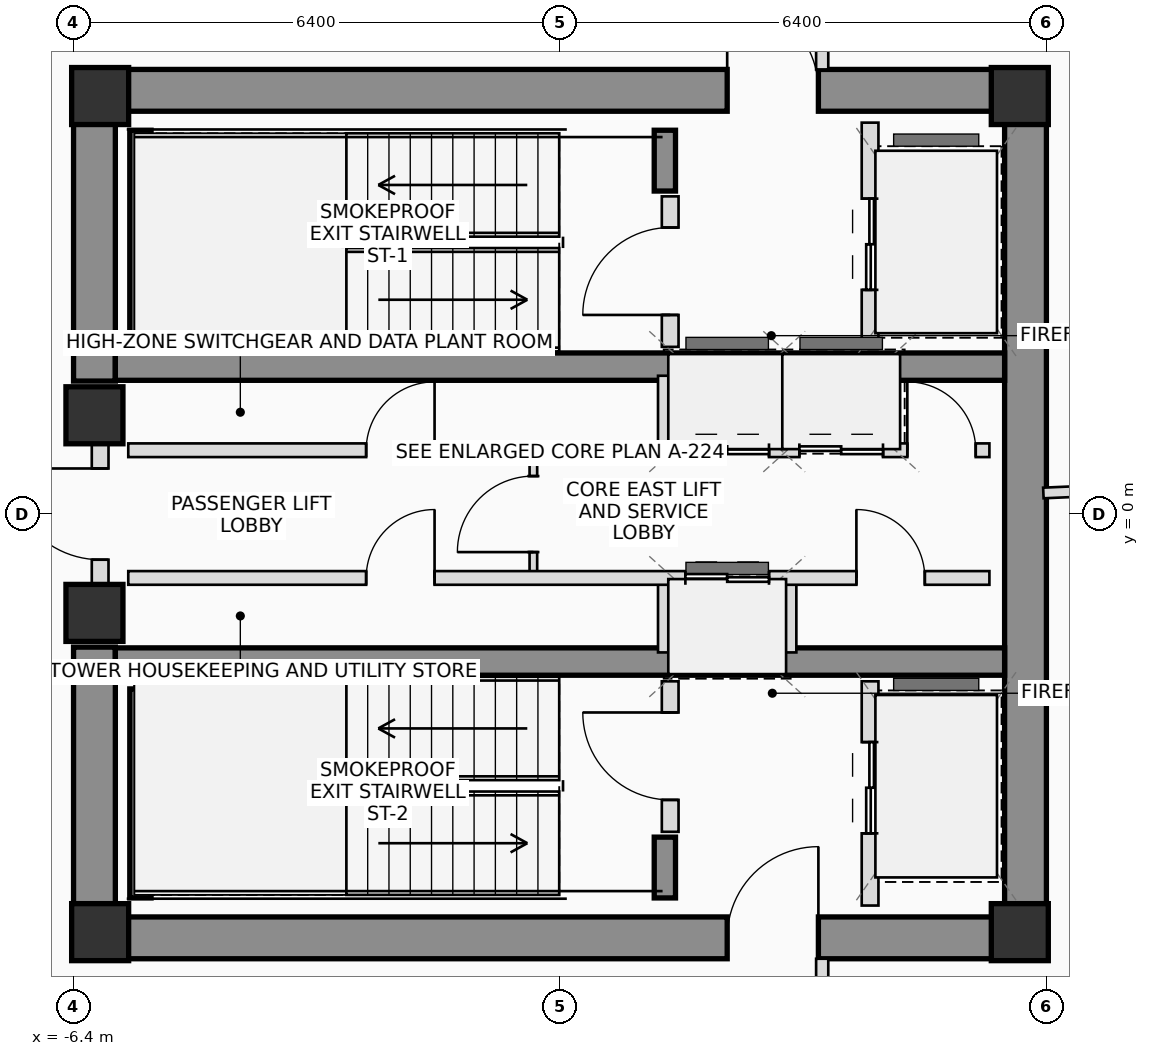
"""IFC4 building model, lengths in metres.
Left out: names, types, materials, properties, quantities, classifications, styles, units other than length and angle.
Written with IfcOpenShell. Run it as: python <this file> out.ifc"""

import sys

from ifc_helpers import new_model, si_unit, direction, frame, frame_2d, origin, origin_2d, place, context, subcontext, project, spatial, rectangle, extrude, source, transform, mapped, element, fill, save


model = new_model("IFC4")
c1 = context("Model", 3, precision=1e-05, world=origin(), true_north=direction((0.0, 1.0)))
c2 = subcontext(c1, "Body", "Model", "MODEL_VIEW")
j1 = project(units=[si_unit("LENGTHUNIT", "METRE"), si_unit("PLANEANGLEUNIT", "RADIAN")], contexts=[c1])
p1 = place(None, origin())
s1 = spatial("IfcSite", under=j1, at=p1, CompositionType="ELEMENT")
p2 = place(p1, origin())
s2 = spatial("IfcBuilding", under=s1, at=p2, CompositionType="ELEMENT")
p3 = place(p2, frame((0.0, 0.0, 260.95)))
s3 = spatial("IfcBuildingStorey", under=s2, at=p3, CompositionType="ELEMENT", Elevation=260.95)
m1 = source(origin(), c2, "Body", "SweptSolid", [
    extrude(rectangle(XDim=0.75, YDim=0.75, at=origin_2d()), origin(), (0.0, 0.0, 1.0), 3.4),
])
for number, where, z_axis, x_axis in (
    (1, (-6.05, -5.5, 0.0), (0.0, 0.0, 1.0), (1.0, 0.0, 0.0)),
    (2, (6.05, -5.5, 0.0), (0.0, 0.0, 1.0), (1.0, 0.0, 0.0)),
    (3, (6.05, 5.5, 0.0), (0.0, 0.0, 1.0), (1.0, 0.0, 0.0)),
    (4, (-6.05, 5.5, 0.0), (0.0, 0.0, 1.0), (1.0, 0.0, 0.0)),
):
    element("IfcColumn", number, at=place(p3, frame(where, z_axis=z_axis, x_axis=x_axis)), inside=s3, PredefinedType="COLUMN", context=c2, shape_type="MappedRepresentation", body=[
        mapped(m1, transform((0.0, 0.0, 0.0), scale=1.0)),
    ])
p4 = place(p3, frame((-6.4, 5.575, 0.0), z_axis=(0.0, 0.0, 1.0), x_axis=(1.0, 0.0, 0.0)))
e5 = element("IfcWall", 5, at=p4, inside=s3, PredefinedType="SHEAR", context=c2, shape_type="SweptSolid", body=[
    extrude(rectangle(XDim=12.8, YDim=0.55, at=frame_2d((6.4, 0.0))), origin(), (0.0, 0.0, 1.0), 3.4),
])
p5 = place(p4, frame((8.6, 0.0, 0.0)))
e6 = element("IfcOpeningElement", 6, at=p5, cuts=e5, PredefinedType="OPENING", context=c2, shape_type="SweptSolid", body=[
    extrude(rectangle(XDim=1.2, YDim=2.2, at=frame_2d((0.6, 1.1))), frame((0.0, 0.285, 0.0), z_axis=(0.0, -1.0, 0.0), x_axis=(1.0, 0.0, 0.0)), (0.0, 0.0, 1.0), 0.57),
])
p6 = place(p3, frame((-6.4, -5.575, 0.0), z_axis=(0.0, 0.0, 1.0), x_axis=(1.0, 0.0, 0.0)))
e7 = element("IfcWall", 7, at=p6, inside=s3, PredefinedType="SHEAR", context=c2, shape_type="SweptSolid", body=[
    extrude(rectangle(XDim=12.8, YDim=0.55, at=frame_2d((6.4, 0.0))), origin(), (0.0, 0.0, 1.0), 3.4),
])
p7 = place(p6, frame((8.6, 0.0, 0.0)))
e8 = element("IfcOpeningElement", 8, at=p7, cuts=e7, PredefinedType="OPENING", context=c2, shape_type="SweptSolid", body=[
    extrude(rectangle(XDim=1.2, YDim=2.2, at=frame_2d((0.6, 1.1))), frame((0.0, 0.285, 0.0), z_axis=(0.0, -1.0, 0.0), x_axis=(1.0, 0.0, 0.0)), (0.0, 0.0, 1.0), 0.57),
])
p8 = place(p3, frame((6.125, -5.3, 0.0), z_axis=(0.0, 0.0, 1.0), x_axis=(0.0, 1.0, 0.0)))
e9 = element("IfcWall", 9, at=p8, inside=s3, PredefinedType="SHEAR", context=c2, shape_type="SweptSolid", body=[
    extrude(rectangle(XDim=10.6, YDim=0.55, at=frame_2d((5.3, 0.0))), origin(), (0.0, 0.0, 1.0), 3.4),
])
for number, where, z_axis, x_axis in (
    (10, (-6.125, -5.3, 0.0), (0.0, 0.0, 1.0), (0.0, 1.0, 0.0)),
    (11, (-6.125, 1.75, 0.0), (0.0, 0.0, 1.0), (0.0, 1.0, 0.0)),
):
    element("IfcWall", number, at=place(p3, frame(where, z_axis=z_axis, x_axis=x_axis)), inside=s3, PredefinedType="SHEAR", context=c2, shape_type="SweptSolid", body=[
        extrude(rectangle(XDim=3.55, YDim=0.55, at=frame_2d((1.775, 0.0))), origin(), (0.0, 0.0, 1.0), 3.4),
    ])
for number, where, z_axis, x_axis in (
    (12, (-5.85, 1.94, 0.0), (0.0, 0.0, 1.0), (1.0, 0.0, 0.0)),
    (13, (-5.85, -1.94, 0.0), (0.0, 0.0, 1.0), (1.0, 0.0, 0.0)),
):
    element("IfcWall", number, at=place(p3, frame(where, z_axis=z_axis, x_axis=x_axis)), inside=s3, PredefinedType="SHEAR", context=c2, shape_type="SweptSolid", body=[
        extrude(rectangle(XDim=11.7, YDim=0.36, at=frame_2d((5.85, 0.0))), origin(), (0.0, 0.0, 1.0), 3.4),
    ])
p9 = place(p3, frame((-5.52, 2.3, 0.0), z_axis=(0.0, 0.0, 1.0), x_axis=(0.0, 1.0, 0.0)))
e14 = element("IfcWall", 14, at=p9, inside=s3, PredefinedType="SHEAR", context=c2, shape_type="SweptSolid", body=[
    extrude(rectangle(XDim=2.75, YDim=0.28, at=frame_2d((1.375, 0.0))), origin(), (0.0, 0.0, 1.0), 3.4),
])
p10 = place(p3, frame((1.38, 4.25, 0.0), z_axis=(0.0, 0.0, 1.0), x_axis=(0.0, 1.0, 0.0)))
e15 = element("IfcWall", 15, at=p10, inside=s3, PredefinedType="SHEAR", context=c2, shape_type="SweptSolid", body=[
    extrude(rectangle(XDim=0.8, YDim=0.28, at=frame_2d((0.4, 0.0))), origin(), (0.0, 0.0, 1.0), 3.4),
])
p11 = place(p3, frame((-5.52, -5.05, 0.0), z_axis=(0.0, 0.0, 1.0), x_axis=(0.0, 1.0, 0.0)))
e16 = element("IfcWall", 16, at=p11, inside=s3, PredefinedType="SHEAR", context=c2, shape_type="SweptSolid", body=[
    extrude(rectangle(XDim=2.75, YDim=0.28, at=frame_2d((1.375, 0.0))), origin(), (0.0, 0.0, 1.0), 3.4),
])
p12 = place(p3, frame((1.38, -5.05, 0.0), z_axis=(0.0, 0.0, 1.0), x_axis=(0.0, 1.0, 0.0)))
e17 = element("IfcWall", 17, at=p12, inside=s3, PredefinedType="SHEAR", context=c2, shape_type="SweptSolid", body=[
    extrude(rectangle(XDim=0.8, YDim=0.28, at=frame_2d((0.4, 0.0))), origin(), (0.0, 0.0, 1.0), 3.4),
])
for number, where, z_axis, x_axis in (
    (18, (-6.125, -1.3, 0.0), (0.0, 0.0, 1.0), (1.0, 0.0, 0.0)),
    (19, (-6.125, 1.3, 0.0), (0.0, 0.0, 1.0), (1.0, 0.0, 0.0)),
):
    element("IfcColumn", number, at=place(p3, frame(where, z_axis=z_axis, x_axis=x_axis)), inside=s3, PredefinedType="COLUMN", context=c2, shape_type="MappedRepresentation", body=[
        mapped(m1, transform((0.0, 0.0, 0.0), scale=1.0)),
    ])
p13 = place(p3, frame((-6.05, -0.95, 0.0), z_axis=(0.0, 0.0, 1.0), x_axis=(0.0, 1.0, 0.0)))
e20 = element("IfcWall", 20, at=p13, inside=s3, PredefinedType="PLUMBINGWALL", context=c2, shape_type="SweptSolid", body=[
    extrude(rectangle(XDim=1.9, YDim=0.22, at=frame_2d((0.95, 0.0))), origin(), (0.0, 0.0, 1.0), 2.18),
])
p14 = place(p13, frame((0.35, 0.0, 0.0)))
e21 = element("IfcOpeningElement", 21, at=p14, cuts=e20, PredefinedType="OPENING", context=c2, shape_type="SweptSolid", body=[
    extrude(rectangle(XDim=1.2, YDim=2.2, at=frame_2d((0.6, 1.1))), frame((0.0, 0.12, 0.0), z_axis=(0.0, -1.0, 0.0), x_axis=(1.0, 0.0, 0.0)), (0.0, 0.0, 1.0), 0.24),
])
p15 = place(p3, frame((1.45, 2.2, 0.0), z_axis=(0.0, 0.0, 1.0), x_axis=(0.0, 1.0, 0.0)))
e22 = element("IfcWall", 22, at=p15, inside=s3, PredefinedType="PLUMBINGWALL", context=c2, shape_type="SweptSolid", body=[
    extrude(rectangle(XDim=1.98, YDim=0.22, at=frame_2d((0.99, 0.0))), origin(), (0.0, 0.0, 1.0), 3.2),
])
p16 = place(p15, frame((0.42, 0.0, 0.0)))
e23 = element("IfcOpeningElement", 23, at=p16, cuts=e22, PredefinedType="OPENING", context=c2, shape_type="SweptSolid", body=[
    extrude(rectangle(XDim=1.15, YDim=2.15, at=frame_2d((0.575, 1.075))), frame((0.0, 0.12, 0.0), z_axis=(0.0, -1.0, 0.0), x_axis=(1.0, 0.0, 0.0)), (0.0, 0.0, 1.0), 0.24),
])
p17 = place(p3, frame((4.08, 2.2, 0.0), z_axis=(0.0, 0.0, 1.0), x_axis=(0.0, 1.0, 0.0)))
e24 = element("IfcWall", 24, at=p17, inside=s3, PredefinedType="PLUMBINGWALL", context=c2, shape_type="SweptSolid", body=[
    extrude(rectangle(XDim=2.95, YDim=0.22, at=frame_2d((1.475, 0.0))), origin(), (0.0, 0.0, 1.0), 3.2),
])
p18 = place(p17, frame((0.75, 0.0, 0.0)))
e25 = element("IfcOpeningElement", 25, at=p18, cuts=e24, PredefinedType="OPENING", context=c2, shape_type="SweptSolid", body=[
    extrude(rectangle(XDim=1.2, YDim=2.25, at=frame_2d((0.6, 1.125))), frame((0.0, 0.12, 0.0), z_axis=(0.0, -1.0, 0.0), x_axis=(1.0, 0.0, 0.0)), (0.0, 0.0, 1.0), 0.24),
])
p19 = place(p3, frame((1.45, -4.18, 0.0), z_axis=(0.0, 0.0, 1.0), x_axis=(0.0, 1.0, 0.0)))
e26 = element("IfcWall", 26, at=p19, inside=s3, PredefinedType="PLUMBINGWALL", context=c2, shape_type="SweptSolid", body=[
    extrude(rectangle(XDim=1.98, YDim=0.22, at=frame_2d((0.99, 0.0))), origin(), (0.0, 0.0, 1.0), 3.2),
])
p20 = place(p19, frame((0.42, 0.0, 0.0)))
e27 = element("IfcOpeningElement", 27, at=p20, cuts=e26, PredefinedType="OPENING", context=c2, shape_type="SweptSolid", body=[
    extrude(rectangle(XDim=1.15, YDim=2.15, at=frame_2d((0.575, 1.075))), frame((0.0, 0.12, 0.0), z_axis=(0.0, -1.0, 0.0), x_axis=(1.0, 0.0, 0.0)), (0.0, 0.0, 1.0), 0.24),
])
p21 = place(p3, frame((4.08, -5.15, 0.0), z_axis=(0.0, 0.0, 1.0), x_axis=(0.0, 1.0, 0.0)))
e28 = element("IfcWall", 28, at=p21, inside=s3, PredefinedType="PLUMBINGWALL", context=c2, shape_type="SweptSolid", body=[
    extrude(rectangle(XDim=2.95, YDim=0.22, at=frame_2d((1.475, 0.0))), origin(), (0.0, 0.0, 1.0), 3.2),
])
p22 = place(p21, frame((0.95, 0.0, 0.0)))
e29 = element("IfcOpeningElement", 29, at=p22, cuts=e28, PredefinedType="OPENING", context=c2, shape_type="SweptSolid", body=[
    extrude(rectangle(XDim=1.2, YDim=2.25, at=frame_2d((0.6, 1.125))), frame((0.0, 0.12, 0.0), z_axis=(0.0, -1.0, 0.0), x_axis=(1.0, 0.0, 0.0)), (0.0, 0.0, 1.0), 0.24),
])
p23 = place(p3, frame((-0.35, -0.84, 0.0), z_axis=(0.0, 0.0, 1.0), x_axis=(0.0, 1.0, 0.0)))
e30 = element("IfcWall", 30, at=p23, inside=s3, PredefinedType="PARTITIONING", context=c2, shape_type="SweptSolid", body=[
    extrude(rectangle(XDim=1.68, YDim=0.1, at=frame_2d((0.84, 0.0))), origin(), (0.0, 0.0, 1.0), 3.2),
])
p24 = place(p23, frame((0.34, 0.0, 0.0)))
e31 = element("IfcOpeningElement", 31, at=p24, cuts=e30, PredefinedType="OPENING", context=c2, shape_type="SweptSolid", body=[
    extrude(rectangle(XDim=1.0, YDim=2.25, at=frame_2d((0.5, 1.125))), frame((0.0, 0.06, 0.0), z_axis=(0.0, -1.0, 0.0), x_axis=(1.0, 0.0, 0.0)), (0.0, 0.0, 1.0), 0.12),
])
for number, where, z_axis, x_axis in (
    (32, (1.38, 0.84, 0.0), (0.0, 0.0, 1.0), (0.0, 1.0, 0.0)),
    (33, (1.38, -1.82, 0.0), (0.0, 0.0, 1.0), (0.0, 1.0, 0.0)),
    (34, (3.02, 0.84, 0.0), (0.0, 0.0, 1.0), (0.0, 1.0, 0.0)),
    (35, (4.38, 0.84, 0.0), (0.0, 0.0, 1.0), (0.0, 1.0, 0.0)),
    (36, (3.02, -1.82, 0.0), (0.0, 0.0, 1.0), (0.0, 1.0, 0.0)),
):
    element("IfcWall", number, at=place(p3, frame(where, z_axis=z_axis, x_axis=x_axis)), inside=s3, PredefinedType="PLUMBINGWALL", context=c2, shape_type="SweptSolid", body=[
        extrude(rectangle(XDim=0.98, YDim=0.18, at=frame_2d((0.49, 0.0))), origin(), (0.0, 0.0, 1.0), 3.2),
    ])
p25 = place(p3, frame((-5.68, 0.84, 0.0), z_axis=(0.0, 0.0, 1.0), x_axis=(1.0, 0.0, 0.0)))
e37 = element("IfcWall", 37, at=p25, inside=s3, PredefinedType="PLUMBINGWALL", context=c2, shape_type="SweptSolid", body=[
    extrude(rectangle(XDim=11.33, YDim=0.18, at=frame_2d((5.665, 0.0))), origin(), (0.0, 0.0, 1.0), 3.2),
])
p26 = place(p25, frame((3.13, 0.0, 0.0)))
e38 = element("IfcOpeningElement", 38, at=p26, cuts=e37, PredefinedType="OPENING", context=c2, shape_type="SweptSolid", body=[
    extrude(rectangle(XDim=0.9, YDim=2.05, at=frame_2d((0.45, 1.025))), frame((0.0, 0.1, 0.0), z_axis=(0.0, -1.0, 0.0), x_axis=(1.0, 0.0, 0.0)), (0.0, 0.0, 1.0), 0.2),
])
p27 = place(p25, frame((7.33, 0.0, 0.0)))
e39 = element("IfcOpeningElement", 39, at=p27, cuts=e37, PredefinedType="OPENING", context=c2, shape_type="SweptSolid", body=[
    extrude(rectangle(XDim=1.1, YDim=2.2, at=frame_2d((0.55, 1.1))), frame((0.0, 0.1, 0.0), z_axis=(0.0, -1.0, 0.0), x_axis=(1.0, 0.0, 0.0)), (0.0, 0.0, 1.0), 0.2),
])
p28 = place(p25, frame((8.83, 0.0, 0.0)))
e40 = element("IfcOpeningElement", 40, at=p28, cuts=e37, PredefinedType="OPENING", context=c2, shape_type="SweptSolid", body=[
    extrude(rectangle(XDim=1.1, YDim=2.2, at=frame_2d((0.55, 1.1))), frame((0.0, 0.1, 0.0), z_axis=(0.0, -1.0, 0.0), x_axis=(1.0, 0.0, 0.0)), (0.0, 0.0, 1.0), 0.2),
])
p29 = place(p25, frame((10.25, 0.0, 0.0)))
e41 = element("IfcOpeningElement", 41, at=p29, cuts=e37, PredefinedType="OPENING", context=c2, shape_type="SweptSolid", body=[
    extrude(rectangle(XDim=0.9, YDim=2.05, at=frame_2d((0.45, 1.025))), frame((0.0, 0.1, 0.0), z_axis=(0.0, -1.0, 0.0), x_axis=(1.0, 0.0, 0.0)), (0.0, 0.0, 1.0), 0.2),
])
p30 = place(p3, frame((-5.68, -0.84, 0.0), z_axis=(0.0, 0.0, 1.0), x_axis=(1.0, 0.0, 0.0)))
e42 = element("IfcWall", 42, at=p30, inside=s3, PredefinedType="PLUMBINGWALL", context=c2, shape_type="SweptSolid", body=[
    extrude(rectangle(XDim=11.33, YDim=0.18, at=frame_2d((5.665, 0.0))), origin(), (0.0, 0.0, 1.0), 3.2),
])
p31 = place(p30, frame((3.13, 0.0, 0.0)))
e43 = element("IfcOpeningElement", 43, at=p31, cuts=e42, PredefinedType="OPENING", context=c2, shape_type="SweptSolid", body=[
    extrude(rectangle(XDim=0.9, YDim=2.05, at=frame_2d((0.45, 1.025))), frame((0.0, 0.1, 0.0), z_axis=(0.0, -1.0, 0.0), x_axis=(1.0, 0.0, 0.0)), (0.0, 0.0, 1.0), 0.2),
])
p32 = place(p30, frame((7.33, 0.0, 0.0)))
e44 = element("IfcOpeningElement", 44, at=p32, cuts=e42, PredefinedType="OPENING", context=c2, shape_type="SweptSolid", body=[
    extrude(rectangle(XDim=1.1, YDim=2.2, at=frame_2d((0.55, 1.1))), frame((0.0, 0.1, 0.0), z_axis=(0.0, -1.0, 0.0), x_axis=(1.0, 0.0, 0.0)), (0.0, 0.0, 1.0), 0.2),
])
p33 = place(p30, frame((9.58, 0.0, 0.0)))
e45 = element("IfcOpeningElement", 45, at=p33, cuts=e42, PredefinedType="OPENING", context=c2, shape_type="SweptSolid", body=[
    extrude(rectangle(XDim=0.9, YDim=2.05, at=frame_2d((0.45, 1.025))), frame((0.0, 0.1, 0.0), z_axis=(0.0, -1.0, 0.0), x_axis=(1.0, 0.0, 0.0)), (0.0, 0.0, 1.0), 0.2),
])
p34 = place(p3, frame((3.45, 7.49, 0.0), z_axis=(0.0, 0.0, 1.0), x_axis=(0.0, -1.0, 0.0)))
e46 = element("IfcWall", 46, at=p34, inside=s3, PredefinedType="PARTITIONING", context=c2, shape_type="SweptSolid", body=[
    extrude(rectangle(XDim=1.64, YDim=0.16, at=frame_2d((0.82, 0.0))), origin(), (0.0, 0.0, 1.0), 2.805),
])
p35 = place(p3, frame((3.45, -5.85, 0.0), z_axis=(0.0, 0.0, 1.0), x_axis=(0.0, -1.0, 0.0)))
e47 = element("IfcWall", 47, at=p35, inside=s3, PredefinedType="PARTITIONING", context=c2, shape_type="SweptSolid", body=[
    extrude(rectangle(XDim=1.64, YDim=0.16, at=frame_2d((0.82, 0.0))), origin(), (0.0, 0.0, 1.0), 3.2),
])
p36 = place(p35, frame((0.32, 0.0, 0.0)))
e48 = element("IfcOpeningElement", 48, at=p36, cuts=e47, PredefinedType="OPENING", context=c2, shape_type="SweptSolid", body=[
    extrude(rectangle(XDim=1.0, YDim=2.25, at=frame_2d((0.5, 1.125))), frame((0.0, 0.09, 0.0), z_axis=(0.0, -1.0, 0.0), x_axis=(1.0, 0.0, 0.0)), (0.0, 0.0, 1.0), 0.18),
])
p37 = place(p3, frame((6.36, 0.278, 0.0), z_axis=(0.0, 0.0, 1.0), x_axis=(0.999047617824, 0.043633213494, 0.0)))
e49 = element("IfcWall", 49, at=p37, inside=s3, PredefinedType="PARTITIONING", context=c2, shape_type="SweptSolid", body=[
    extrude(rectangle(XDim=13.406, YDim=0.14, at=frame_2d((6.703, 0.0))), origin(), (0.0, 0.0, 1.0), 2.605),
])
p38 = place(p5, origin())
e50 = element("IfcDoor", 50, at=p38, inside=s3, OperationType="SINGLE_SWING_LEFT", PredefinedType="DOOR", context=c2, shape_type="SweptSolid", body=[
    extrude(rectangle(XDim=1.2, YDim=2.2, at=frame_2d((0.6, 1.1))), frame((0.0, 0.025, 0.0), z_axis=(0.0, -1.0, 0.0), x_axis=(1.0, 0.0, 0.0)), (0.0, 0.0, 1.0), 0.05),
])
fill(e6, e50)
p39 = place(p7, origin())
e51 = element("IfcDoor", 51, at=p39, inside=s3, OperationType="SINGLE_SWING_RIGHT", PredefinedType="DOOR", context=c2, shape_type="SweptSolid", body=[
    extrude(rectangle(XDim=1.2, YDim=2.2, at=frame_2d((0.6, 1.1))), frame((0.0, 0.025, 0.0), z_axis=(0.0, -1.0, 0.0), x_axis=(1.0, 0.0, 0.0)), (0.0, 0.0, 1.0), 0.05),
])
fill(e8, e51)
p40 = place(p14, origin())
e52 = element("IfcDoor", 52, at=p40, inside=s3, OperationType="SINGLE_SWING_RIGHT", PredefinedType="DOOR", context=c2, shape_type="SweptSolid", body=[
    extrude(rectangle(XDim=1.2, YDim=2.2, at=frame_2d((0.6, 1.1))), frame((0.0, 0.025, 0.0), z_axis=(0.0, -1.0, 0.0), x_axis=(1.0, 0.0, 0.0)), (0.0, 0.0, 1.0), 0.05),
])
fill(e21, e52)
p41 = place(p16, origin())
e53 = element("IfcDoor", 53, at=p41, inside=s3, OperationType="SINGLE_SWING_LEFT", PredefinedType="DOOR", context=c2, shape_type="SweptSolid", body=[
    extrude(rectangle(XDim=1.15, YDim=2.15, at=frame_2d((0.575, 1.075))), frame((0.0, 0.025, 0.0), z_axis=(0.0, -1.0, 0.0), x_axis=(1.0, 0.0, 0.0)), (0.0, 0.0, 1.0), 0.05),
])
fill(e23, e53)
p42 = place(p18, origin())
e54 = element("IfcDoor", 54, at=p42, inside=s3, OperationType="DOUBLE_DOOR_SLIDING", PredefinedType="DOOR", context=c2, shape_type="SweptSolid", body=[
    extrude(rectangle(XDim=1.2, YDim=2.25, at=frame_2d((0.6, 1.125))), frame((0.0, 0.025, 0.0), z_axis=(0.0, -1.0, 0.0), x_axis=(1.0, 0.0, 0.0)), (0.0, 0.0, 1.0), 0.05),
])
fill(e25, e54)
p43 = place(p20, origin())
e55 = element("IfcDoor", 55, at=p43, inside=s3, OperationType="SINGLE_SWING_RIGHT", PredefinedType="DOOR", context=c2, shape_type="SweptSolid", body=[
    extrude(rectangle(XDim=1.15, YDim=2.15, at=frame_2d((0.575, 1.075))), frame((0.0, 0.025, 0.0), z_axis=(0.0, -1.0, 0.0), x_axis=(1.0, 0.0, 0.0)), (0.0, 0.0, 1.0), 0.05),
])
fill(e27, e55)
p44 = place(p22, origin())
e56 = element("IfcDoor", 56, at=p44, inside=s3, OperationType="DOUBLE_DOOR_SLIDING", PredefinedType="DOOR", context=c2, shape_type="SweptSolid", body=[
    extrude(rectangle(XDim=1.2, YDim=2.25, at=frame_2d((0.6, 1.125))), frame((0.0, 0.025, 0.0), z_axis=(0.0, -1.0, 0.0), x_axis=(1.0, 0.0, 0.0)), (0.0, 0.0, 1.0), 0.05),
])
fill(e29, e56)
p45 = place(p24, origin())
e57 = element("IfcDoor", 57, at=p45, inside=s3, OperationType="SINGLE_SWING_LEFT", PredefinedType="DOOR", context=c2, shape_type="SweptSolid", body=[
    extrude(rectangle(XDim=1.0, YDim=2.25, at=frame_2d((0.5, 1.125))), frame((0.0, 0.025, 0.0), z_axis=(0.0, -1.0, 0.0), x_axis=(1.0, 0.0, 0.0)), (0.0, 0.0, 1.0), 0.05),
])
fill(e31, e57)
p46 = place(p26, origin())
e58 = element("IfcDoor", 58, at=p46, inside=s3, OperationType="SINGLE_SWING_RIGHT", PredefinedType="DOOR", context=c2, shape_type="SweptSolid", body=[
    extrude(rectangle(XDim=0.9, YDim=2.05, at=frame_2d((0.45, 1.025))), frame((0.0, 0.025, 0.0), z_axis=(0.0, -1.0, 0.0), x_axis=(1.0, 0.0, 0.0)), (0.0, 0.0, 1.0), 0.05),
])
fill(e38, e58)
p47 = place(p27, origin())
e59 = element("IfcDoor", 59, at=p47, inside=s3, OperationType="DOUBLE_DOOR_SLIDING", PredefinedType="DOOR", context=c2, shape_type="SweptSolid", body=[
    extrude(rectangle(XDim=1.1, YDim=2.2, at=frame_2d((0.55, 1.1))), frame((0.0, 0.025, 0.0), z_axis=(0.0, -1.0, 0.0), x_axis=(1.0, 0.0, 0.0)), (0.0, 0.0, 1.0), 0.05),
])
fill(e39, e59)
p48 = place(p28, origin())
e60 = element("IfcDoor", 60, at=p48, inside=s3, OperationType="DOUBLE_DOOR_SLIDING", PredefinedType="DOOR", context=c2, shape_type="SweptSolid", body=[
    extrude(rectangle(XDim=1.1, YDim=2.2, at=frame_2d((0.55, 1.1))), frame((0.0, 0.025, 0.0), z_axis=(0.0, -1.0, 0.0), x_axis=(1.0, 0.0, 0.0)), (0.0, 0.0, 1.0), 0.05),
])
fill(e40, e60)
p49 = place(p29, origin())
e61 = element("IfcDoor", 61, at=p49, inside=s3, OperationType="SINGLE_SWING_LEFT", PredefinedType="DOOR", context=c2, shape_type="SweptSolid", body=[
    extrude(rectangle(XDim=0.9, YDim=2.05, at=frame_2d((0.45, 1.025))), frame((0.0, 0.025, 0.0), z_axis=(0.0, -1.0, 0.0), x_axis=(1.0, 0.0, 0.0)), (0.0, 0.0, 1.0), 0.05),
])
fill(e41, e61)
p50 = place(p31, origin())
e62 = element("IfcDoor", 62, at=p50, inside=s3, OperationType="SINGLE_SWING_RIGHT", PredefinedType="DOOR", context=c2, shape_type="SweptSolid", body=[
    extrude(rectangle(XDim=0.9, YDim=2.05, at=frame_2d((0.45, 1.025))), frame((0.0, 0.025, 0.0), z_axis=(0.0, -1.0, 0.0), x_axis=(1.0, 0.0, 0.0)), (0.0, 0.0, 1.0), 0.05),
])
fill(e43, e62)
p51 = place(p32, origin())
e63 = element("IfcDoor", 63, at=p51, inside=s3, OperationType="DOUBLE_DOOR_SLIDING", PredefinedType="DOOR", context=c2, shape_type="SweptSolid", body=[
    extrude(rectangle(XDim=1.1, YDim=2.2, at=frame_2d((0.55, 1.1))), frame((0.0, 0.025, 0.0), z_axis=(0.0, -1.0, 0.0), x_axis=(1.0, 0.0, 0.0)), (0.0, 0.0, 1.0), 0.05),
])
fill(e44, e63)
p52 = place(p33, origin())
e64 = element("IfcDoor", 64, at=p52, inside=s3, OperationType="SINGLE_SWING_LEFT", PredefinedType="DOOR", context=c2, shape_type="SweptSolid", body=[
    extrude(rectangle(XDim=0.9, YDim=2.05, at=frame_2d((0.45, 1.025))), frame((0.0, 0.025, 0.0), z_axis=(0.0, -1.0, 0.0), x_axis=(1.0, 0.0, 0.0)), (0.0, 0.0, 1.0), 0.05),
])
fill(e45, e64)
save(model, sys.argv[1])
